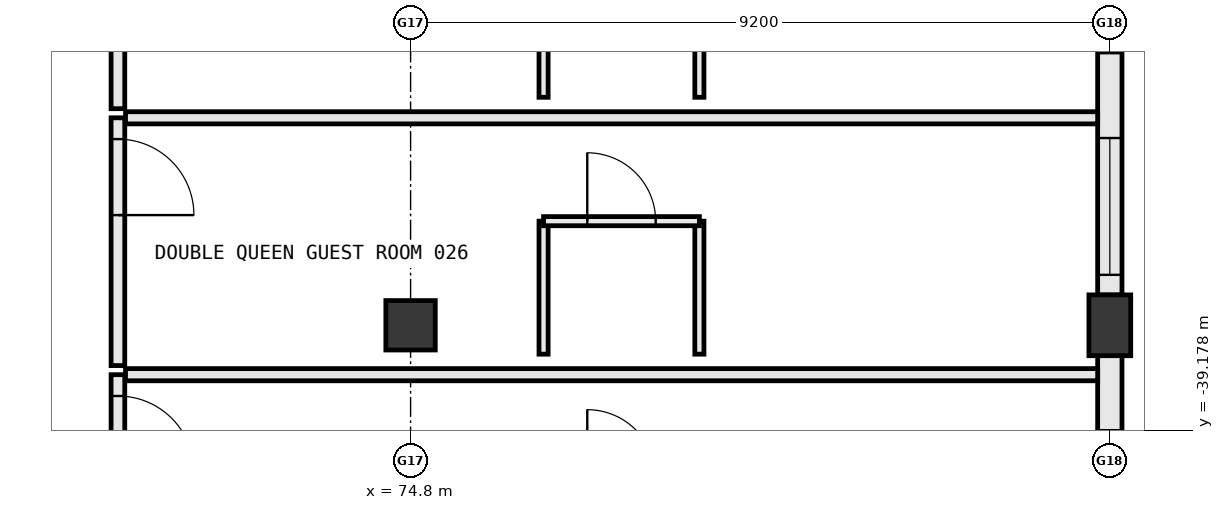
"""IFC4 building model, lengths in metres.
Left out: names, types, materials, properties, quantities, classifications, styles, units other than length and angle.
Written with IfcOpenShell. Run it as: python <this file> out.ifc"""

import sys

from ifc_helpers import new_model, si_unit, direction, frame, frame_2d, origin, origin_2d, place, context, subcontext, project, spatial, rectangle, extrude, element, fill, save


model = new_model("IFC4")
c1 = context("Model", 3, precision=1e-05, world=origin(), true_north=direction((0.0, 1.0)))
c2 = subcontext(c1, "Body", "Model", "MODEL_VIEW")
j1 = project(units=[si_unit("LENGTHUNIT", "METRE"), si_unit("PLANEANGLEUNIT", "RADIAN")], contexts=[c1])
p1 = place(None, origin())
s1 = spatial("IfcSite", under=j1, at=p1, CompositionType="ELEMENT")
p2 = place(p1, origin())
s2 = spatial("IfcBuilding", under=s1, at=p2, CompositionType="ELEMENT")
p3 = place(p2, frame((0.0, 0.0, 10.8)))
s3 = spatial("IfcBuildingStorey", under=s2, at=p3, CompositionType="ELEMENT", Elevation=10.8)
p4 = place(p3, frame((74.8, -37.8, 0.0), z_axis=(0.0, 0.0, 1.0), x_axis=(1.0, 0.0, 0.0)))
e1 = element("IfcColumn", 1, at=p4, inside=s3, PredefinedType="COLUMN", context=c2, shape_type="SweptSolid", body=[
    extrude(rectangle(XDim=0.65, YDim=0.65, at=origin_2d()), origin(), (0.0, 0.0, 1.0), 5.4),
])
p5 = place(p3, frame((84.0, -37.8, 0.0), z_axis=(0.0, 0.0, 1.0), x_axis=(1.0, 0.0, 0.0)))
e2 = element("IfcColumn", 2, at=p5, inside=s3, PredefinedType="PILASTER", context=c2, shape_type="SweptSolid", body=[
    extrude(rectangle(XDim=0.55, YDim=0.8, at=origin_2d()), origin(), (0.0, 0.0, 1.0), 5.4),
])
p6 = place(p3, frame((84.0, -47.002, 0.0), z_axis=(0.0, 0.0, 1.0), x_axis=(0.0, 1.0, 0.0)))
e3 = element("IfcWall", 3, at=p6, inside=s3, PredefinedType="STANDARD", context=c2, shape_type="SweptSolid", body=[
    extrude(rectangle(XDim=8.804, YDim=0.32, at=frame_2d((4.402, 0.0))), origin(), (0.0, 0.0, 1.0), 4.332),
])
p7 = place(p6, frame((0.146, 0.0, 0.85)))
e4 = element("IfcOpeningElement", 4, at=p7, cuts=e3, PredefinedType="OPENING", context=c2, shape_type="SweptSolid", body=[
    extrude(rectangle(XDim=1.5, YDim=1.75, at=frame_2d((0.75, 0.875))), frame((0.0, 0.172, 0.0), z_axis=(0.0, -1.0, 0.0), x_axis=(1.0, 0.0, 0.0)), (0.0, 0.0, 1.0), 0.344),
])
p8 = place(p6, frame((2.642, 0.0, 0.85)))
e5 = element("IfcOpeningElement", 5, at=p8, cuts=e3, PredefinedType="OPENING", context=c2, shape_type="SweptSolid", body=[
    extrude(rectangle(XDim=1.8, YDim=1.85, at=frame_2d((0.9, 0.925))), frame((0.0, 0.172, 0.0), z_axis=(0.0, -1.0, 0.0), x_axis=(1.0, 0.0, 0.0)), (0.0, 0.0, 1.0), 0.344),
])
p9 = place(p6, frame((6.022, 0.0, 0.85)))
e6 = element("IfcOpeningElement", 6, at=p9, cuts=e3, PredefinedType="OPENING", context=c2, shape_type="SweptSolid", body=[
    extrude(rectangle(XDim=1.8, YDim=1.85, at=frame_2d((0.9, 0.925))), frame((0.0, 0.172, 0.0), z_axis=(0.0, -1.0, 0.0), x_axis=(1.0, 0.0, 0.0)), (0.0, 0.0, 1.0), 0.344),
])
p10 = place(p3, frame((84.0, -37.402, 0.0), z_axis=(0.0, 0.0, 1.0), x_axis=(0.0, 1.0, 0.0)))
e7 = element("IfcWall", 7, at=p10, inside=s3, PredefinedType="STANDARD", context=c2, shape_type="SweptSolid", body=[
    extrude(rectangle(XDim=8.804, YDim=0.32, at=frame_2d((4.402, 0.0))), origin(), (0.0, 0.0, 1.0), 4.332),
])
p11 = place(p10, frame((0.266, 0.0, 0.85)))
e8 = element("IfcOpeningElement", 8, at=p11, cuts=e7, PredefinedType="OPENING", context=c2, shape_type="SweptSolid", body=[
    extrude(rectangle(XDim=1.8, YDim=1.85, at=frame_2d((0.9, 0.925))), frame((0.0, 0.172, 0.0), z_axis=(0.0, -1.0, 0.0), x_axis=(1.0, 0.0, 0.0)), (0.0, 0.0, 1.0), 0.344),
])
p12 = place(p10, frame((3.182, 0.0, 0.85)))
e9 = element("IfcOpeningElement", 9, at=p12, cuts=e7, PredefinedType="OPENING", context=c2, shape_type="SweptSolid", body=[
    extrude(rectangle(XDim=1.8, YDim=1.85, at=frame_2d((0.9, 0.925))), frame((0.0, 0.172, 0.0), z_axis=(0.0, -1.0, 0.0), x_axis=(1.0, 0.0, 0.0)), (0.0, 0.0, 1.0), 0.344),
])
p13 = place(p10, frame((6.418, 0.0, 0.85)))
e10 = element("IfcOpeningElement", 10, at=p13, cuts=e7, PredefinedType="OPENING", context=c2, shape_type="SweptSolid", body=[
    extrude(rectangle(XDim=1.8, YDim=1.85, at=frame_2d((0.9, 0.925))), frame((0.0, 0.172, 0.0), z_axis=(0.0, -1.0, 0.0), x_axis=(1.0, 0.0, 0.0)), (0.0, 0.0, 1.0), 0.344),
])
p14 = place(p3, frame((70.95, -38.45, 0.0), z_axis=(0.0, 0.0, 1.0), x_axis=(0.0, -1.0, 0.0)))
e11 = element("IfcWall", 11, at=p14, inside=s3, PredefinedType="PARTITIONING", context=c2, shape_type="SweptSolid", body=[
    extrude(rectangle(XDim=3.26, YDim=0.18, at=frame_2d((1.63, 0.0))), origin(), (0.0, 0.0, 1.0), 4.8),
])
p15 = place(p14, frame((0.28, 0.0, 0.0)))
e12 = element("IfcOpeningElement", 12, at=p15, cuts=e11, PredefinedType="OPENING", context=c2, shape_type="SweptSolid", body=[
    extrude(rectangle(XDim=1.0, YDim=2.2, at=frame_2d((0.5, 1.1))), frame((0.0, 0.102, 0.0), z_axis=(0.0, -1.0, 0.0), x_axis=(1.0, 0.0, 0.0)), (0.0, 0.0, 1.0), 0.204),
])
p16 = place(p3, frame((71.05, -38.45, 0.0), z_axis=(0.0, 0.0, 1.0), x_axis=(1.0, 0.0, 0.0)))
e13 = element("IfcWall", 13, at=p16, inside=s3, PredefinedType="PARTITIONING", context=c2, shape_type="SweptSolid", body=[
    extrude(rectangle(XDim=12.79, YDim=0.16, at=frame_2d((6.395, 0.0))), origin(), (0.0, 0.0, 1.0), 4.8),
])
p17 = place(p3, frame((70.95, -35.07, 0.0), z_axis=(0.0, 0.0, 1.0), x_axis=(0.0, -1.0, 0.0)))
e14 = element("IfcWall", 14, at=p17, inside=s3, PredefinedType="PARTITIONING", context=c2, shape_type="SweptSolid", body=[
    extrude(rectangle(XDim=3.26, YDim=0.18, at=frame_2d((1.63, 0.0))), origin(), (0.0, 0.0, 1.0), 4.8),
])
p18 = place(p17, frame((0.28, 0.0, 0.0)))
e15 = element("IfcOpeningElement", 15, at=p18, cuts=e14, PredefinedType="OPENING", context=c2, shape_type="SweptSolid", body=[
    extrude(rectangle(XDim=1.0, YDim=2.2, at=frame_2d((0.5, 1.1))), frame((0.0, 0.102, 0.0), z_axis=(0.0, -1.0, 0.0), x_axis=(1.0, 0.0, 0.0)), (0.0, 0.0, 1.0), 0.204),
])
p19 = place(p3, frame((71.05, -35.07, 0.0), z_axis=(0.0, 0.0, 1.0), x_axis=(1.0, 0.0, 0.0)))
e16 = element("IfcWall", 16, at=p19, inside=s3, PredefinedType="PARTITIONING", context=c2, shape_type="SweptSolid", body=[
    extrude(rectangle(XDim=12.79, YDim=0.16, at=frame_2d((6.395, 0.0))), origin(), (0.0, 0.0, 1.0), 4.8),
])
for number, where, z_axis, x_axis in (
    (17, (76.55, -38.18, 0.0), (0.0, 0.0, 1.0), (0.0, 1.0, 0.0)),
    (18, (78.6, -38.18, 0.0), (0.0, 0.0, 1.0), (0.0, 1.0, 0.0)),
):
    element("IfcWall", number, at=place(p3, frame(where, z_axis=z_axis, x_axis=x_axis)), inside=s3, PredefinedType="PARTITIONING", context=c2, shape_type="SweptSolid", body=[
        extrude(rectangle(XDim=1.75, YDim=0.12, at=frame_2d((0.875, 0.0))), origin(), (0.0, 0.0, 1.0), 4.8),
    ])
p20 = place(p3, frame((76.55, -36.43, 0.0), z_axis=(0.0, 0.0, 1.0), x_axis=(1.0, 0.0, 0.0)))
e19 = element("IfcWall", 19, at=p20, inside=s3, PredefinedType="PARTITIONING", context=c2, shape_type="SweptSolid", body=[
    extrude(rectangle(XDim=2.05, YDim=0.12, at=frame_2d((1.025, 0.0))), origin(), (0.0, 0.0, 1.0), 4.8),
])
p21 = place(p20, frame((0.575, 0.0, 0.0)))
e20 = element("IfcOpeningElement", 20, at=p21, cuts=e19, PredefinedType="OPENING", context=c2, shape_type="SweptSolid", body=[
    extrude(rectangle(XDim=0.9, YDim=2.15, at=frame_2d((0.45, 1.075))), frame((0.0, 0.072, 0.0), z_axis=(0.0, -1.0, 0.0), x_axis=(1.0, 0.0, 0.0)), (0.0, 0.0, 1.0), 0.144),
])
p22 = place(p3, frame((70.95, -31.69, 0.0), z_axis=(0.0, 0.0, 1.0), x_axis=(0.0, -1.0, 0.0)))
e21 = element("IfcWall", 21, at=p22, inside=s3, PredefinedType="PARTITIONING", context=c2, shape_type="SweptSolid", body=[
    extrude(rectangle(XDim=3.26, YDim=0.18, at=frame_2d((1.63, 0.0))), origin(), (0.0, 0.0, 1.0), 4.8),
])
p23 = place(p22, frame((0.28, 0.0, 0.0)))
e22 = element("IfcOpeningElement", 22, at=p23, cuts=e21, PredefinedType="OPENING", context=c2, shape_type="SweptSolid", body=[
    extrude(rectangle(XDim=1.0, YDim=2.2, at=frame_2d((0.5, 1.1))), frame((0.0, 0.102, 0.0), z_axis=(0.0, -1.0, 0.0), x_axis=(1.0, 0.0, 0.0)), (0.0, 0.0, 1.0), 0.204),
])
for number, where, z_axis, x_axis in (
    (23, (76.55, -34.8, 0.0), (0.0, 0.0, 1.0), (0.0, 1.0, 0.0)),
    (24, (78.6, -34.8, 0.0), (0.0, 0.0, 1.0), (0.0, 1.0, 0.0)),
):
    element("IfcWall", number, at=place(p3, frame(where, z_axis=z_axis, x_axis=x_axis)), inside=s3, PredefinedType="PARTITIONING", context=c2, shape_type="SweptSolid", body=[
        extrude(rectangle(XDim=1.75, YDim=0.12, at=frame_2d((0.875, 0.0))), origin(), (0.0, 0.0, 1.0), 4.8),
    ])
p24 = place(p9, origin())
e25 = element("IfcWindow", 25, at=p24, inside=s3, PartitioningType="SINGLE_PANEL", PredefinedType="WINDOW", context=c2, shape_type="SweptSolid", body=[
    extrude(rectangle(XDim=1.8, YDim=1.85, at=frame_2d((0.9, 0.925))), frame((0.0, 0.03, 0.0), z_axis=(0.0, -1.0, 0.0), x_axis=(1.0, 0.0, 0.0)), (0.0, 0.0, 1.0), 0.06),
])
fill(e6, e25)
p25 = place(p11, origin())
e26 = element("IfcWindow", 26, at=p25, inside=s3, PartitioningType="SINGLE_PANEL", PredefinedType="WINDOW", context=c2, shape_type="SweptSolid", body=[
    extrude(rectangle(XDim=1.8, YDim=1.85, at=frame_2d((0.9, 0.925))), frame((0.0, 0.03, 0.0), z_axis=(0.0, -1.0, 0.0), x_axis=(1.0, 0.0, 0.0)), (0.0, 0.0, 1.0), 0.06),
])
fill(e8, e26)
p26 = place(p12, origin())
e27 = element("IfcWindow", 27, at=p26, inside=s3, PartitioningType="SINGLE_PANEL", PredefinedType="WINDOW", context=c2, shape_type="SweptSolid", body=[
    extrude(rectangle(XDim=1.8, YDim=1.85, at=frame_2d((0.9, 0.925))), frame((0.0, 0.03, 0.0), z_axis=(0.0, -1.0, 0.0), x_axis=(1.0, 0.0, 0.0)), (0.0, 0.0, 1.0), 0.06),
])
fill(e9, e27)
p27 = place(p15, origin())
e28 = element("IfcDoor", 28, at=p27, inside=s3, OperationType="SINGLE_SWING_RIGHT", PredefinedType="DOOR", context=c2, shape_type="SweptSolid", body=[
    extrude(rectangle(XDim=1.0, YDim=2.2, at=frame_2d((0.5, 1.1))), frame((0.0, 0.025, 0.0), z_axis=(0.0, -1.0, 0.0), x_axis=(1.0, 0.0, 0.0)), (0.0, 0.0, 1.0), 0.05),
])
fill(e12, e28)
p28 = place(p18, origin())
e29 = element("IfcDoor", 29, at=p28, inside=s3, OperationType="SINGLE_SWING_RIGHT", PredefinedType="DOOR", context=c2, shape_type="SweptSolid", body=[
    extrude(rectangle(XDim=1.0, YDim=2.2, at=frame_2d((0.5, 1.1))), frame((0.0, 0.025, 0.0), z_axis=(0.0, -1.0, 0.0), x_axis=(1.0, 0.0, 0.0)), (0.0, 0.0, 1.0), 0.05),
])
fill(e15, e29)
p29 = place(p21, origin())
e30 = element("IfcDoor", 30, at=p29, inside=s3, OperationType="SINGLE_SWING_LEFT", PredefinedType="DOOR", context=c2, shape_type="SweptSolid", body=[
    extrude(rectangle(XDim=0.9, YDim=2.15, at=frame_2d((0.45, 1.075))), frame((0.0, 0.025, 0.0), z_axis=(0.0, -1.0, 0.0), x_axis=(1.0, 0.0, 0.0)), (0.0, 0.0, 1.0), 0.05),
])
fill(e20, e30)
save(model, sys.argv[1])
